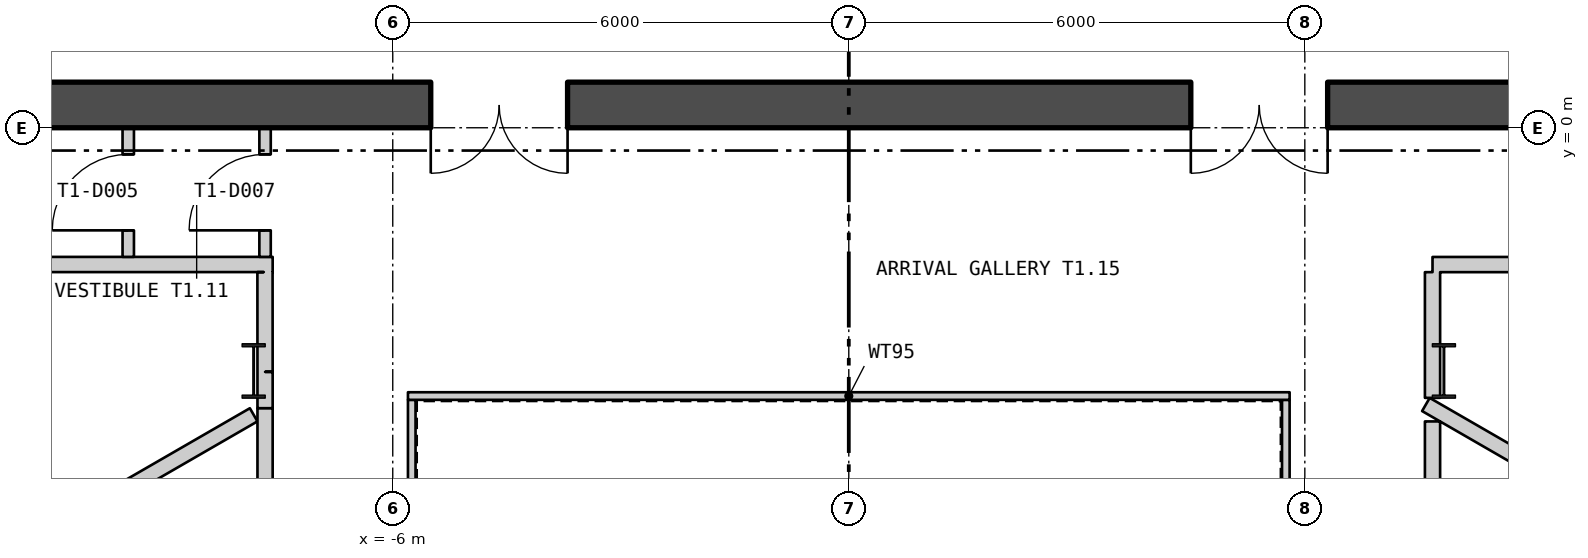
"""IFC4 building model, lengths in metres.
Left out: names, types, materials, properties, quantities, classifications, styles, units other than length and angle.
Written with IfcOpenShell. Run it as: python <this file> out.ifc"""

import sys

from ifc_helpers import new_model, si_unit, direction, frame, frame_2d, origin, origin_2d, place, context, subcontext, project, spatial, polyline, rectangle, i_section, outline, extrude, element, fill, save


model = new_model("IFC4")
c1 = context("Model", 3, precision=1e-05, world=origin(), true_north=direction((0.0, 1.0)))
c2 = subcontext(c1, "Body", "Model", "MODEL_VIEW")
j1 = project(units=[si_unit("LENGTHUNIT", "METRE"), si_unit("PLANEANGLEUNIT", "RADIAN")], contexts=[c1])
p1 = place(None, origin())
s1 = spatial("IfcSite", under=j1, at=p1, CompositionType="ELEMENT")
p2 = place(p1, origin())
s2 = spatial("IfcBuilding", under=s1, at=p2, CompositionType="ELEMENT")
p3 = place(p2, frame((0.0, 0.0, 78.3)))
s3 = spatial("IfcBuildingStorey", under=s2, at=p3, CompositionType="ELEMENT", Elevation=78.3)
for number, where, z_axis, x_axis in (
    (1, (7.83, -3.2, 0.0), (0.0, 0.0, 1.0), (1.0, 0.0, 0.0)),
    (2, (-7.83, -3.2, 0.0), (0.0, 0.0, 1.0), (1.0, 0.0, 0.0)),
):
    element("IfcColumn", number, at=place(p3, frame(where, z_axis=z_axis, x_axis=x_axis)), inside=s3, PredefinedType="COLUMN", context=c2, shape_type="SweptSolid", body=[
        extrude(i_section(OverallWidth=0.304, OverallDepth=0.716, WebThickness=0.021, FlangeThickness=0.04, at=origin_2d()), origin(), (0.0, 0.0, 1.0), 6.0),
    ])
p4 = place(p3, frame((-28.09, 10.934, -0.18), z_axis=(0.0, 0.0, 1.0), x_axis=(0.500000711659, -0.866024992908, 0.0)))
e3 = element("IfcWall", 3, at=p4, inside=s3, PredefinedType="SOLIDWALL", context=c2, shape_type="SweptSolid", body=[
    extrude(outline(polyline([(-0.13, -0.225), (45.87, -0.225), (45.61, 0.225), (0.13, 0.225), (-0.13, -0.225)])), origin(), (0.0, 0.0, 1.0), 6.0),
])
p5 = place(p4, frame((1.424, 0.0, 1.38)))
e4 = element("IfcOpeningElement", 4, at=p5, cuts=e3, PredefinedType="OPENING", context=c2, shape_type="SweptSolid", body=[
    extrude(rectangle(XDim=2.4, YDim=3.6, at=frame_2d((1.2, 1.8))), frame((0.0, 0.235, 0.0), z_axis=(0.0, -1.0, 0.0), x_axis=(1.0, 0.0, 0.0)), (0.0, 0.0, 1.0), 0.47),
])
p6 = place(p4, frame((5.893, 0.0, 1.38)))
e5 = element("IfcOpeningElement", 5, at=p6, cuts=e3, PredefinedType="OPENING", context=c2, shape_type="SweptSolid", body=[
    extrude(rectangle(XDim=2.4, YDim=3.6, at=frame_2d((1.2, 1.8))), frame((0.0, 0.235, 0.0), z_axis=(0.0, -1.0, 0.0), x_axis=(1.0, 0.0, 0.0)), (0.0, 0.0, 1.0), 0.47),
])
p7 = place(p4, frame((10.401, 0.0, 1.38)))
e6 = element("IfcOpeningElement", 6, at=p7, cuts=e3, PredefinedType="OPENING", context=c2, shape_type="SweptSolid", body=[
    extrude(rectangle(XDim=2.4, YDim=3.6, at=frame_2d((1.2, 1.8))), frame((0.0, 0.235, 0.0), z_axis=(0.0, -1.0, 0.0), x_axis=(1.0, 0.0, 0.0)), (0.0, 0.0, 1.0), 0.47),
])
p8 = place(p4, frame((14.909, 0.0, 1.38)))
e7 = element("IfcOpeningElement", 7, at=p8, cuts=e3, PredefinedType="OPENING", context=c2, shape_type="SweptSolid", body=[
    extrude(rectangle(XDim=2.4, YDim=3.6, at=frame_2d((1.2, 1.8))), frame((0.0, 0.235, 0.0), z_axis=(0.0, -1.0, 0.0), x_axis=(1.0, 0.0, 0.0)), (0.0, 0.0, 1.0), 0.47),
])
p9 = place(p4, frame((19.416, 0.0, 1.38)))
e8 = element("IfcOpeningElement", 8, at=p9, cuts=e3, PredefinedType="OPENING", context=c2, shape_type="SweptSolid", body=[
    extrude(rectangle(XDim=2.4, YDim=3.6, at=frame_2d((1.2, 1.8))), frame((0.0, 0.235, 0.0), z_axis=(0.0, -1.0, 0.0), x_axis=(1.0, 0.0, 0.0)), (0.0, 0.0, 1.0), 0.47),
])
p10 = place(p4, frame((23.924, 0.0, 1.38)))
e9 = element("IfcOpeningElement", 9, at=p10, cuts=e3, PredefinedType="OPENING", context=c2, shape_type="SweptSolid", body=[
    extrude(rectangle(XDim=2.4, YDim=3.6, at=frame_2d((1.2, 1.8))), frame((0.0, 0.235, 0.0), z_axis=(0.0, -1.0, 0.0), x_axis=(1.0, 0.0, 0.0)), (0.0, 0.0, 1.0), 0.47),
])
p11 = place(p4, frame((28.431, 0.0, 1.38)))
e10 = element("IfcOpeningElement", 10, at=p11, cuts=e3, PredefinedType="OPENING", context=c2, shape_type="SweptSolid", body=[
    extrude(rectangle(XDim=2.4, YDim=3.6, at=frame_2d((1.2, 1.8))), frame((0.0, 0.235, 0.0), z_axis=(0.0, -1.0, 0.0), x_axis=(1.0, 0.0, 0.0)), (0.0, 0.0, 1.0), 0.47),
])
p12 = place(p4, frame((32.939, 0.0, 1.38)))
e11 = element("IfcOpeningElement", 11, at=p12, cuts=e3, PredefinedType="OPENING", context=c2, shape_type="SweptSolid", body=[
    extrude(rectangle(XDim=2.4, YDim=3.6, at=frame_2d((1.2, 1.8))), frame((0.0, 0.235, 0.0), z_axis=(0.0, -1.0, 0.0), x_axis=(1.0, 0.0, 0.0)), (0.0, 0.0, 1.0), 0.47),
])
p13 = place(p4, frame((37.447, 0.0, 1.38)))
e12 = element("IfcOpeningElement", 12, at=p13, cuts=e3, PredefinedType="OPENING", context=c2, shape_type="SweptSolid", body=[
    extrude(rectangle(XDim=2.4, YDim=3.6, at=frame_2d((1.2, 1.8))), frame((0.0, 0.235, 0.0), z_axis=(0.0, -1.0, 0.0), x_axis=(1.0, 0.0, 0.0)), (0.0, 0.0, 1.0), 0.47),
])
p14 = place(p4, frame((41.916, 0.0, 1.38)))
e13 = element("IfcOpeningElement", 13, at=p14, cuts=e3, PredefinedType="OPENING", context=c2, shape_type="SweptSolid", body=[
    extrude(rectangle(XDim=2.4, YDim=3.6, at=frame_2d((1.2, 1.8))), frame((0.0, 0.235, 0.0), z_axis=(0.0, -1.0, 0.0), x_axis=(1.0, 0.0, 0.0)), (0.0, 0.0, 1.0), 0.47),
])
p15 = place(p3, frame((5.22, -28.679, -0.18), z_axis=(0.0, 0.0, 1.0), x_axis=(0.500000711659, 0.866024992908, 0.0)))
e14 = element("IfcWall", 14, at=p15, inside=s3, PredefinedType="SOLIDWALL", context=c2, shape_type="SweptSolid", body=[
    extrude(outline(polyline([(-0.13, -0.225), (45.87, -0.225), (45.61, 0.225), (0.13, 0.225), (-0.13, -0.225)])), origin(), (0.0, 0.0, 1.0), 6.0),
])
p16 = place(p15, frame((1.424, 0.0, 1.38)))
e15 = element("IfcOpeningElement", 15, at=p16, cuts=e14, PredefinedType="OPENING", context=c2, shape_type="SweptSolid", body=[
    extrude(rectangle(XDim=2.4, YDim=3.6, at=frame_2d((1.2, 1.8))), frame((0.0, 0.235, 0.0), z_axis=(0.0, -1.0, 0.0), x_axis=(1.0, 0.0, 0.0)), (0.0, 0.0, 1.0), 0.47),
])
p17 = place(p15, frame((5.893, 0.0, 1.38)))
e16 = element("IfcOpeningElement", 16, at=p17, cuts=e14, PredefinedType="OPENING", context=c2, shape_type="SweptSolid", body=[
    extrude(rectangle(XDim=2.4, YDim=3.6, at=frame_2d((1.2, 1.8))), frame((0.0, 0.235, 0.0), z_axis=(0.0, -1.0, 0.0), x_axis=(1.0, 0.0, 0.0)), (0.0, 0.0, 1.0), 0.47),
])
p18 = place(p15, frame((10.401, 0.0, 1.38)))
e17 = element("IfcOpeningElement", 17, at=p18, cuts=e14, PredefinedType="OPENING", context=c2, shape_type="SweptSolid", body=[
    extrude(rectangle(XDim=2.4, YDim=3.6, at=frame_2d((1.2, 1.8))), frame((0.0, 0.235, 0.0), z_axis=(0.0, -1.0, 0.0), x_axis=(1.0, 0.0, 0.0)), (0.0, 0.0, 1.0), 0.47),
])
p19 = place(p15, frame((14.909, 0.0, 1.38)))
e18 = element("IfcOpeningElement", 18, at=p19, cuts=e14, PredefinedType="OPENING", context=c2, shape_type="SweptSolid", body=[
    extrude(rectangle(XDim=2.4, YDim=3.6, at=frame_2d((1.2, 1.8))), frame((0.0, 0.235, 0.0), z_axis=(0.0, -1.0, 0.0), x_axis=(1.0, 0.0, 0.0)), (0.0, 0.0, 1.0), 0.47),
])
p20 = place(p15, frame((19.416, 0.0, 1.38)))
e19 = element("IfcOpeningElement", 19, at=p20, cuts=e14, PredefinedType="OPENING", context=c2, shape_type="SweptSolid", body=[
    extrude(rectangle(XDim=2.4, YDim=3.6, at=frame_2d((1.2, 1.8))), frame((0.0, 0.235, 0.0), z_axis=(0.0, -1.0, 0.0), x_axis=(1.0, 0.0, 0.0)), (0.0, 0.0, 1.0), 0.47),
])
p21 = place(p15, frame((23.924, 0.0, 1.38)))
e20 = element("IfcOpeningElement", 20, at=p21, cuts=e14, PredefinedType="OPENING", context=c2, shape_type="SweptSolid", body=[
    extrude(rectangle(XDim=2.4, YDim=3.6, at=frame_2d((1.2, 1.8))), frame((0.0, 0.235, 0.0), z_axis=(0.0, -1.0, 0.0), x_axis=(1.0, 0.0, 0.0)), (0.0, 0.0, 1.0), 0.47),
])
p22 = place(p15, frame((28.431, 0.0, 1.38)))
e21 = element("IfcOpeningElement", 21, at=p22, cuts=e14, PredefinedType="OPENING", context=c2, shape_type="SweptSolid", body=[
    extrude(rectangle(XDim=2.4, YDim=3.6, at=frame_2d((1.2, 1.8))), frame((0.0, 0.235, 0.0), z_axis=(0.0, -1.0, 0.0), x_axis=(1.0, 0.0, 0.0)), (0.0, 0.0, 1.0), 0.47),
])
p23 = place(p15, frame((32.939, 0.0, 1.38)))
e22 = element("IfcOpeningElement", 22, at=p23, cuts=e14, PredefinedType="OPENING", context=c2, shape_type="SweptSolid", body=[
    extrude(rectangle(XDim=2.4, YDim=3.6, at=frame_2d((1.2, 1.8))), frame((0.0, 0.235, 0.0), z_axis=(0.0, -1.0, 0.0), x_axis=(1.0, 0.0, 0.0)), (0.0, 0.0, 1.0), 0.47),
])
p24 = place(p15, frame((37.447, 0.0, 1.38)))
e23 = element("IfcOpeningElement", 23, at=p24, cuts=e14, PredefinedType="OPENING", context=c2, shape_type="SweptSolid", body=[
    extrude(rectangle(XDim=2.4, YDim=3.6, at=frame_2d((1.2, 1.8))), frame((0.0, 0.235, 0.0), z_axis=(0.0, -1.0, 0.0), x_axis=(1.0, 0.0, 0.0)), (0.0, 0.0, 1.0), 0.47),
])
p25 = place(p15, frame((41.916, 0.0, 1.38)))
e24 = element("IfcOpeningElement", 24, at=p25, cuts=e14, PredefinedType="OPENING", context=c2, shape_type="SweptSolid", body=[
    extrude(rectangle(XDim=2.4, YDim=3.6, at=frame_2d((1.2, 1.8))), frame((0.0, 0.235, 0.0), z_axis=(0.0, -1.0, 0.0), x_axis=(1.0, 0.0, 0.0)), (0.0, 0.0, 1.0), 0.47),
])
p26 = place(p3, frame((5.75, -11.62, 0.0), z_axis=(0.0, 0.0, 1.0), x_axis=(0.0, 1.0, 0.0)))
e25 = element("IfcWall", 25, at=p26, inside=s3, PredefinedType="PARTITIONING", context=c2, shape_type="SweptSolid", body=[
    extrude(rectangle(XDim=8.04, YDim=0.1, at=frame_2d((4.02, 0.0))), origin(), (0.0, 0.0, 1.0), 5.8),
])
p27 = place(p3, frame((5.8, -3.53, 0.0), z_axis=(0.0, 0.0, 1.0), x_axis=(-1.0, 0.0, 0.0)))
e26 = element("IfcWall", 26, at=p27, inside=s3, PredefinedType="PARTITIONING", context=c2, shape_type="SweptSolid", body=[
    extrude(rectangle(XDim=11.6, YDim=0.1, at=frame_2d((5.8, 0.0))), origin(), (0.0, 0.0, 1.0), 5.8),
])
p28 = place(p3, frame((-5.75, -3.58, 0.0), z_axis=(0.0, 0.0, 1.0), x_axis=(0.0, -1.0, 0.0)))
e27 = element("IfcWall", 27, at=p28, inside=s3, PredefinedType="PARTITIONING", context=c2, shape_type="SweptSolid", body=[
    extrude(rectangle(XDim=8.04, YDim=0.1, at=frame_2d((4.02, 0.0))), origin(), (0.0, 0.0, 1.0), 5.8),
])
p29 = place(p3, frame((-17.5, 0.3, 0.0), z_axis=(0.0, 0.0, 1.0), x_axis=(1.0, 0.0, 0.0)))
e28 = element("IfcWall", 28, at=p29, inside=s3, PredefinedType="SHEAR", context=c2, shape_type="SweptSolid", body=[
    extrude(rectangle(XDim=35.0, YDim=0.6, at=frame_2d((17.5, 0.0))), origin(), (0.0, 0.0, 1.0), 5.8),
])
p30 = place(p29, frame((12.0, 0.0, 0.0)))
e29 = element("IfcOpeningElement", 29, at=p30, cuts=e28, PredefinedType="OPENING", context=c2, shape_type="SweptSolid", body=[
    extrude(rectangle(XDim=1.8, YDim=2.4, at=frame_2d((0.9, 1.2))), frame((0.0, 0.31, 0.0), z_axis=(0.0, -1.0, 0.0), x_axis=(1.0, 0.0, 0.0)), (0.0, 0.0, 1.0), 0.62),
])
p31 = place(p29, frame((22.0, 0.0, 0.0)))
e30 = element("IfcOpeningElement", 30, at=p31, cuts=e28, PredefinedType="OPENING", context=c2, shape_type="SweptSolid", body=[
    extrude(rectangle(XDim=1.8, YDim=2.4, at=frame_2d((0.9, 1.2))), frame((0.0, 0.31, 0.0), z_axis=(0.0, -1.0, 0.0), x_axis=(1.0, 0.0, 0.0)), (0.0, 0.0, 1.0), 0.62),
])
p32 = place(p3, frame((-17.499, -1.8, 0.0), z_axis=(0.0, 0.0, 1.0), x_axis=(0.999999994918, 0.000100816614, 0.0)))
e31 = element("IfcWall", 31, at=p32, inside=s3, PredefinedType="PARTITIONING", context=c2, shape_type="SweptSolid", body=[
    extrude(rectangle(XDim=9.919, YDim=0.2, at=frame_2d((4.96, 0.0))), origin(), (0.0, 0.0, 1.0), 5.8),
])
p33 = place(p32, frame((5.01, 0.0, 0.0)))
e32 = element("IfcOpeningElement", 32, at=p33, cuts=e31, PredefinedType="OPENING", context=c2, shape_type="SweptSolid", body=[
    extrude(rectangle(XDim=1.1, YDim=2.1, at=frame_2d((0.55, 1.05))), frame((0.0, 0.11, 0.0), z_axis=(0.0, -1.0, 0.0), x_axis=(1.0, 0.0, 0.0)), (0.0, 0.0, 1.0), 0.22),
])
p34 = place(p3, frame((-16.071, -8.534, 0.0), z_axis=(0.0, 0.0, 1.0), x_axis=(0.866068339032, 0.499925626596, 0.0)))
e33 = element("IfcWall", 33, at=p34, inside=s3, PredefinedType="PARTITIONING", context=c2, shape_type="SweptSolid", body=[
    extrude(rectangle(XDim=9.515, YDim=0.2, at=frame_2d((4.758, 0.0))), origin(), (0.0, 0.0, 1.0), 5.8),
])
p35 = place(p3, frame((-9.48, -1.699, 0.0), z_axis=(0.0, 0.0, 1.0), x_axis=(0.0, 1.0, 0.0)))
e34 = element("IfcWall", 34, at=p35, inside=s3, PredefinedType="PARTITIONING", context=c2, shape_type="SweptSolid", body=[
    extrude(rectangle(XDim=1.698, YDim=0.15, at=frame_2d((0.849, 0.0))), origin(), (0.0, 0.0, 1.0), 5.2),
])
p36 = place(p35, frame((0.349, 0.0, 0.0)))
e35 = element("IfcOpeningElement", 35, at=p36, cuts=e34, PredefinedType="OPENING", context=c2, shape_type="SweptSolid", body=[
    extrude(rectangle(XDim=1.0, YDim=2.1, at=frame_2d((0.5, 1.05))), frame((0.0, 0.085, 0.0), z_axis=(0.0, -1.0, 0.0), x_axis=(1.0, 0.0, 0.0)), (0.0, 0.0, 1.0), 0.17),
])
p37 = place(p3, frame((-7.681, -1.899, 0.0), z_axis=(0.0, 0.0, 1.0), x_axis=(0.000761614402, -0.999999709972, 0.0)))
e36 = element("IfcWall", 36, at=p37, inside=s3, PredefinedType="PARTITIONING", context=c2, shape_type="SweptSolid", body=[
    extrude(rectangle(XDim=1.313, YDim=0.2, at=frame_2d((0.656, 0.0))), origin(), (0.0, 0.0, 1.0), 5.8),
])
p38 = place(p3, frame((-7.68, -13.7, 0.0), z_axis=(0.0, 0.0, 1.0), x_axis=(0.0, 1.0, 0.0)))
e37 = element("IfcWall", 37, at=p38, inside=s3, PredefinedType="PARTITIONING", context=c2, shape_type="SweptSolid", body=[
    extrude(rectangle(XDim=10.008, YDim=0.2, at=frame_2d((5.004, 0.0))), origin(), (0.0, 0.0, 1.0), 5.2),
])
p39 = place(p38, frame((4.304, 0.0, 0.0)))
e38 = element("IfcOpeningElement", 38, at=p39, cuts=e37, PredefinedType="OPENING", context=c2, shape_type="SweptSolid", body=[
    extrude(rectangle(XDim=1.1, YDim=2.1, at=frame_2d((0.55, 1.05))), frame((0.0, 0.11, 0.0), z_axis=(0.0, -1.0, 0.0), x_axis=(1.0, 0.0, 0.0)), (0.0, 0.0, 1.0), 0.22),
])
p40 = place(p3, frame((-7.68, -3.69, 0.0), z_axis=(0.0, 0.0, 1.0), x_axis=(0.0, 1.0, 0.0)))
e39 = element("IfcWall", 39, at=p40, inside=s3, PredefinedType="PARTITIONING", context=c2, shape_type="SweptSolid", body=[
    extrude(rectangle(XDim=0.478, YDim=0.2, at=frame_2d((0.239, 0.0))), origin(), (0.0, 0.0, 1.0), 5.2),
])
p41 = place(p3, frame((-7.68, -1.699, 0.0), z_axis=(0.0, 0.0, 1.0), x_axis=(0.0, 1.0, 0.0)))
e40 = element("IfcWall", 40, at=p41, inside=s3, PredefinedType="PARTITIONING", context=c2, shape_type="SweptSolid", body=[
    extrude(rectangle(XDim=1.698, YDim=0.15, at=frame_2d((0.849, 0.0))), origin(), (0.0, 0.0, 1.0), 5.8),
])
p42 = place(p41, frame((0.349, 0.0, 0.0)))
e41 = element("IfcOpeningElement", 41, at=p42, cuts=e40, PredefinedType="OPENING", context=c2, shape_type="SweptSolid", body=[
    extrude(rectangle(XDim=1.0, YDim=2.1, at=frame_2d((0.5, 1.05))), frame((0.0, 0.085, 0.0), z_axis=(0.0, -1.0, 0.0), x_axis=(1.0, 0.0, 0.0)), (0.0, 0.0, 1.0), 0.17),
])
p43 = place(p3, frame((7.593, -3.641, 0.0), z_axis=(0.0, 0.0, 1.0), x_axis=(0.866059708757, -0.499940577336, 0.0)))
e42 = element("IfcWall", 42, at=p43, inside=s3, PredefinedType="PARTITIONING", context=c2, shape_type="SweptSolid", body=[
    extrude(rectangle(XDim=9.789, YDim=0.2, at=frame_2d((4.895, 0.0))), origin(), (0.0, 0.0, 1.0), 5.8),
])
p44 = place(p3, frame((7.68, -13.7, 0.0), z_axis=(0.0, 0.0, 1.0), x_axis=(0.0, 1.0, 0.0)))
e43 = element("IfcWall", 43, at=p44, inside=s3, PredefinedType="PARTITIONING", context=c2, shape_type="SweptSolid", body=[
    extrude(rectangle(XDim=9.836, YDim=0.2, at=frame_2d((4.918, 0.0))), origin(), (0.0, 0.0, 1.0), 5.2),
])
p45 = place(p44, frame((1.852, 0.0, 0.0)))
e44 = element("IfcOpeningElement", 44, at=p45, cuts=e43, PredefinedType="OPENING", context=c2, shape_type="SweptSolid", body=[
    extrude(rectangle(XDim=1.1, YDim=2.1, at=frame_2d((0.55, 1.05))), frame((0.0, 0.11, 0.0), z_axis=(0.0, -1.0, 0.0), x_axis=(1.0, 0.0, 0.0)), (0.0, 0.0, 1.0), 0.22),
])
p46 = place(p44, frame((5.004, 0.0, 0.0)))
e45 = element("IfcOpeningElement", 45, at=p46, cuts=e43, PredefinedType="OPENING", context=c2, shape_type="SweptSolid", body=[
    extrude(rectangle(XDim=1.1, YDim=2.1, at=frame_2d((0.55, 1.05))), frame((0.0, 0.11, 0.0), z_axis=(0.0, -1.0, 0.0), x_axis=(1.0, 0.0, 0.0)), (0.0, 0.0, 1.0), 0.22),
])
p47 = place(p3, frame((7.68, -3.554, 0.0), z_axis=(0.0, 0.0, 1.0), x_axis=(0.0, 1.0, 0.0)))
e46 = element("IfcWall", 46, at=p47, inside=s3, PredefinedType="PARTITIONING", context=c2, shape_type="SweptSolid", body=[
    extrude(rectangle(XDim=1.654, YDim=0.2, at=frame_2d((0.827, 0.0))), origin(), (0.0, 0.0, 1.0), 5.8),
])
p48 = place(p3, frame((7.68, -1.8, 0.0), z_axis=(0.0, 0.0, 1.0), x_axis=(1.0, 0.0, 0.0)))
e47 = element("IfcWall", 47, at=p48, inside=s3, PredefinedType="PARTITIONING", context=c2, shape_type="SweptSolid", body=[
    extrude(rectangle(XDim=5.763, YDim=0.2, at=frame_2d((2.881, 0.0))), origin(), (0.0, 0.0, 1.0), 5.8),
])
p49 = place(p48, frame((2.219, 0.0, 0.0)))
e48 = element("IfcOpeningElement", 48, at=p49, cuts=e47, PredefinedType="OPENING", context=c2, shape_type="SweptSolid", body=[
    extrude(rectangle(XDim=1.1, YDim=2.1, at=frame_2d((0.55, 1.05))), frame((0.0, 0.11, 0.0), z_axis=(0.0, -1.0, 0.0), x_axis=(1.0, 0.0, 0.0)), (0.0, 0.0, 1.0), 0.22),
])
p50 = place(p30, origin())
e49 = element("IfcDoor", 49, at=p50, inside=s3, OperationType="DOUBLE_DOOR_SINGLE_SWING", PredefinedType="DOOR", context=c2, shape_type="SweptSolid", body=[
    extrude(rectangle(XDim=1.8, YDim=2.4, at=frame_2d((0.9, 1.2))), frame((0.0, 0.025, 0.0), z_axis=(0.0, -1.0, 0.0), x_axis=(1.0, 0.0, 0.0)), (0.0, 0.0, 1.0), 0.05),
])
fill(e29, e49)
p51 = place(p31, origin())
e50 = element("IfcDoor", 50, at=p51, inside=s3, OperationType="DOUBLE_DOOR_SINGLE_SWING", PredefinedType="DOOR", context=c2, shape_type="SweptSolid", body=[
    extrude(rectangle(XDim=1.8, YDim=2.4, at=frame_2d((0.9, 1.2))), frame((0.0, 0.025, 0.0), z_axis=(0.0, -1.0, 0.0), x_axis=(1.0, 0.0, 0.0)), (0.0, 0.0, 1.0), 0.05),
])
fill(e30, e50)
p52 = place(p36, origin())
e51 = element("IfcDoor", 51, at=p52, inside=s3, OperationType="SINGLE_SWING_RIGHT", PredefinedType="DOOR", context=c2, shape_type="SweptSolid", body=[
    extrude(rectangle(XDim=1.0, YDim=2.1, at=frame_2d((0.5, 1.05))), frame((0.0, 0.025, 0.0), z_axis=(0.0, -1.0, 0.0), x_axis=(1.0, 0.0, 0.0)), (0.0, 0.0, 1.0), 0.05),
])
fill(e35, e51)
p53 = place(p42, origin())
e52 = element("IfcDoor", 52, at=p53, inside=s3, OperationType="SINGLE_SWING_RIGHT", PredefinedType="DOOR", context=c2, shape_type="SweptSolid", body=[
    extrude(rectangle(XDim=1.0, YDim=2.1, at=frame_2d((0.5, 1.05))), frame((0.0, 0.025, 0.0), z_axis=(0.0, -1.0, 0.0), x_axis=(1.0, 0.0, 0.0)), (0.0, 0.0, 1.0), 0.05),
])
fill(e41, e52)
save(model, sys.argv[1])
